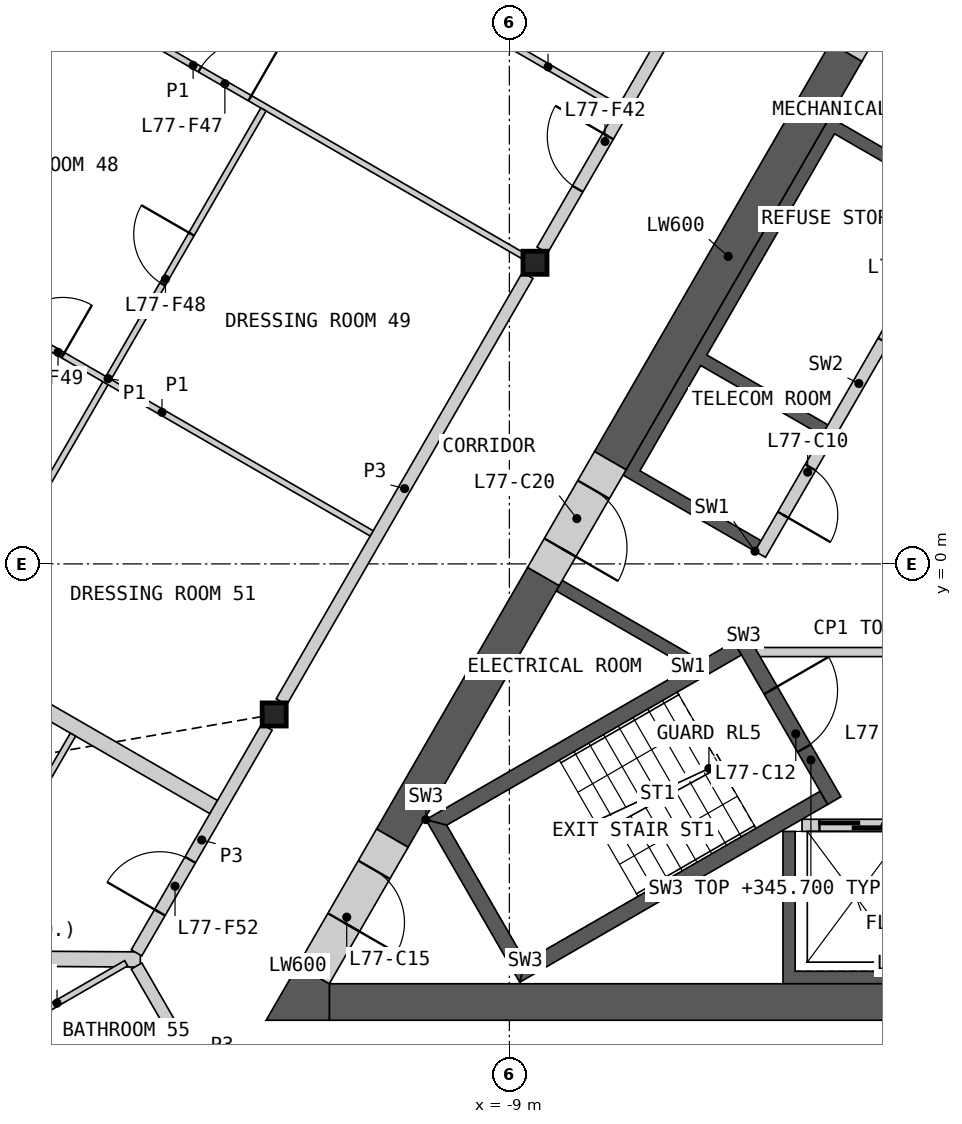
"""IFC4 building model, lengths in metres.
Left out: names, types, materials, properties, quantities, classifications, styles, units other than length and angle.
Written with IfcOpenShell. Run it as: python <this file> out.ifc"""

import sys

from ifc_helpers import new_model, si_unit, direction, frame, frame_2d, origin, origin_2d, place, context, subcontext, project, spatial, polyline, rectangle, i_section, outline, extrude, element, fill, save


model = new_model("IFC4")
c1 = context("Model", 3, precision=1e-05, world=origin(), true_north=direction((0.0, 1.0)))
c2 = subcontext(c1, "Body", "Model", "MODEL_VIEW")
j1 = project(units=[si_unit("LENGTHUNIT", "METRE"), si_unit("PLANEANGLEUNIT", "RADIAN")], contexts=[c1])
p1 = place(None, origin())
s1 = spatial("IfcSite", under=j1, at=p1, CompositionType="ELEMENT")
p2 = place(p1, origin())
s2 = spatial("IfcBuilding", under=s1, at=p2, CompositionType="ELEMENT")
p3 = place(p2, frame((0.0, 0.0, 342.6)))
s3 = spatial("IfcBuildingStorey", under=s2, at=p3, CompositionType="ELEMENT", Elevation=342.6)
for number, where, z_axis, x_axis in (
    (1, (-8.578, 4.953, 0.0), (0.0, 0.0, 1.0), (1.0, 0.0, 0.0)),
    (2, (-12.868, -2.476, 0.0), (0.0, 0.0, 1.0), (1.0, 0.0, 0.0)),
):
    element("IfcColumn", number, at=place(p3, frame(where, z_axis=z_axis, x_axis=x_axis)), inside=s3, PredefinedType="COLUMN", context=c2, shape_type="SweptSolid", body=[
        extrude(i_section(OverallWidth=0.396, OverallDepth=0.381, WebThickness=0.019, FlangeThickness=0.03, at=origin_2d()), origin(), (0.0, 0.0, 1.0), 3.4),
    ])
p4 = place(p3, origin())
e3 = element("IfcWall", 3, at=p4, inside=s3, PredefinedType="SHEAR", context=c2, shape_type="SweptSolid", body=[
    extrude(outline(polyline([(4.5, -4.4), (4.5, -6.906), (-4.5, -6.906), (-4.5, -4.4), (-4.3, -4.4), (-4.3, -6.7), (-2.3, -6.7), (-2.3, -4.4), (-2.1, -4.4), (-2.1, -6.7), (-0.1, -6.7), (-0.1, -4.4), (0.1, -4.4), (0.1, -6.7), (2.1, -6.7), (2.1, -4.4), (2.3, -4.4), (2.3, -6.7), (4.3, -6.7), (4.3, -4.4), (4.5, -4.4)])), origin(), (0.0, 0.0, 1.0), 3.1),
])
p5 = place(p3, frame((-4.187, -4.3, 0.0), z_axis=(0.0, 0.0, 1.0), x_axis=(1.0, 0.0, 0.0)))
e4 = element("IfcWall", 4, at=p5, inside=s3, PredefinedType="SOLIDWALL", context=c2, shape_type="SweptSolid", body=[
    extrude(rectangle(XDim=8.373, YDim=0.2, at=frame_2d((4.187, 0.0))), origin(), (0.0, 0.0, 1.0), 3.1),
])
p6 = place(p5, frame((0.287, 0.0, 0.0)))
e5 = element("IfcOpeningElement", 5, at=p6, cuts=e4, PredefinedType="OPENING", context=c2, shape_type="SweptSolid", body=[
    extrude(rectangle(XDim=1.2, YDim=2.1, at=frame_2d((0.6, 1.05))), frame((0.0, 0.11, 0.0), z_axis=(0.0, -1.0, 0.0), x_axis=(1.0, 0.0, 0.0)), (0.0, 0.0, 1.0), 0.22),
])
p7 = place(p5, frame((2.387, 0.0, 0.0)))
e6 = element("IfcOpeningElement", 6, at=p7, cuts=e4, PredefinedType="OPENING", context=c2, shape_type="SweptSolid", body=[
    extrude(rectangle(XDim=1.4, YDim=2.1, at=frame_2d((0.7, 1.05))), frame((0.0, 0.11, 0.0), z_axis=(0.0, -1.0, 0.0), x_axis=(1.0, 0.0, 0.0)), (0.0, 0.0, 1.0), 0.22),
])
p8 = place(p5, frame((4.737, 0.0, 0.0)))
e7 = element("IfcOpeningElement", 7, at=p8, cuts=e4, PredefinedType="OPENING", context=c2, shape_type="SweptSolid", body=[
    extrude(rectangle(XDim=1.1, YDim=2.1, at=frame_2d((0.55, 1.05))), frame((0.0, 0.11, 0.0), z_axis=(0.0, -1.0, 0.0), x_axis=(1.0, 0.0, 0.0)), (0.0, 0.0, 1.0), 0.22),
])
p9 = place(p5, frame((6.887, 0.0, 0.0)))
e8 = element("IfcOpeningElement", 8, at=p9, cuts=e4, PredefinedType="OPENING", context=c2, shape_type="SweptSolid", body=[
    extrude(rectangle(XDim=1.2, YDim=2.1, at=frame_2d((0.6, 1.05))), frame((0.0, 0.11, 0.0), z_axis=(0.0, -1.0, 0.0), x_axis=(1.0, 0.0, 0.0)), (0.0, 0.0, 1.0), 0.22),
])
p10 = place(p3, origin())
e9 = element("IfcWall", 9, at=p10, inside=s3, PredefinedType="SHEAR", context=c2, shape_type="SweptSolid", body=[
    extrude(outline(polyline([(-6.061, -1.697), (-8.231, -0.444), (-8.131, -0.271), (-5.96, -1.524), (-6.061, -1.697)])), origin(), (0.0, 0.0, 1.0), 3.1),
])
p11 = place(p3, origin())
e10 = element("IfcWall", 10, at=p11, inside=s3, PredefinedType="SHEAR", context=c2, shape_type="SweptSolid", body=[
    extrude(outline(polyline([(-4.96, 0.208), (-7.131, 1.461), (-3.731, 7.35), (-1.561, 6.097), (-1.66, 5.924), (-3.652, 7.074), (-5.752, 3.437), (-3.76, 2.287), (-3.861, 2.113), (-5.852, 3.263), (-6.852, 1.531), (-4.861, 0.381), (-4.96, 0.208)])), origin(), (0.0, 0.0, 1.0), 3.1),
])
p12 = place(p3, frame((-1.631, 5.776, 0.0), z_axis=(0.0, 0.0, 1.0), x_axis=(-0.499992876559, -0.866029516466, 0.0)))
e11 = element("IfcWall", 11, at=p12, inside=s3, PredefinedType="SOLIDWALL", context=c2, shape_type="SweptSolid", body=[
    extrude(rectangle(XDim=6.486, YDim=0.2, at=frame_2d((3.243, 0.0))), origin(), (0.0, 0.0, 1.0), 3.1),
])
p13 = place(p12, frame((1.537, 0.0, 0.0)))
e12 = element("IfcOpeningElement", 12, at=p13, cuts=e11, PredefinedType="OPENING", context=c2, shape_type="SweptSolid", body=[
    extrude(rectangle(XDim=0.9, YDim=2.1, at=frame_2d((0.45, 1.05))), frame((0.0, 0.11, 0.0), z_axis=(0.0, -1.0, 0.0), x_axis=(1.0, 0.0, 0.0)), (0.0, 0.0, 1.0), 0.22),
])
p14 = place(p12, frame((4.837, 0.0, 0.0)))
e13 = element("IfcOpeningElement", 13, at=p14, cuts=e11, PredefinedType="OPENING", context=c2, shape_type="SweptSolid", body=[
    extrude(rectangle(XDim=0.9, YDim=2.1, at=frame_2d((0.45, 1.05))), frame((0.0, 0.11, 0.0), z_axis=(0.0, -1.0, 0.0), x_axis=(1.0, 0.0, 0.0)), (0.0, 0.0, 1.0), 0.22),
])
p15 = place(p3, frame((-4.941, -1.45, 0.0), z_axis=(0.0, 0.0, 1.0), x_axis=(1.0, 0.0, 0.0)))
e14 = element("IfcWall", 14, at=p15, inside=s3, PredefinedType="PARTITIONING", context=c2, shape_type="SweptSolid", body=[
    extrude(rectangle(XDim=9.882, YDim=0.15, at=frame_2d((4.941, 0.0))), origin(), (0.0, 0.0, 1.0), 3.1),
])
p16 = place(p15, frame((4.391, 0.0, 0.0)))
e15 = element("IfcOpeningElement", 15, at=p16, cuts=e14, PredefinedType="OPENING", context=c2, shape_type="SweptSolid", body=[
    extrude(rectangle(XDim=1.1, YDim=2.1, at=frame_2d((0.55, 1.05))), frame((0.0, 0.085, 0.0), z_axis=(0.0, -1.0, 0.0), x_axis=(1.0, 0.0, 0.0)), (0.0, 0.0, 1.0), 0.17),
])
p17 = place(p3, origin())
e16 = element("IfcWall", 16, at=p17, inside=s3, PredefinedType="SHEAR", context=c2, shape_type="SweptSolid", body=[
    extrude(outline(polyline([(-5.307, -1.281), (-10.374, -4.206), (-10.032, -4.298), (-5.182, -1.498), (-5.307, -1.281)])), origin(), (0.0, 0.0, 1.0), 3.1),
])
p18 = place(p3, origin())
e17 = element("IfcWall", 17, at=p18, inside=s3, PredefinedType="SHEAR", context=c2, shape_type="SweptSolid", body=[
    extrude(outline(polyline([(-10.374, -4.206), (-8.83, -6.881), (-8.738, -6.539), (-10.032, -4.298), (-10.374, -4.206)])), origin(), (0.0, 0.0, 1.0), 3.1),
])
p19 = place(p3, origin())
e18 = element("IfcWall", 18, at=p19, inside=s3, PredefinedType="SHEAR", context=c2, shape_type="SweptSolid", body=[
    extrude(outline(polyline([(-8.738, -6.539), (-8.83, -6.881), (-3.763, -3.956), (-3.888, -3.739), (-8.738, -6.539)])), origin(), (0.0, 0.0, 1.0), 3.1),
])
p20 = place(p3, frame((-5.199, -1.219, 0.0), z_axis=(0.0, 0.0, 1.0), x_axis=(0.499982516597, -0.866035497597, 0.0)))
e19 = element("IfcWall", 19, at=p20, inside=s3, PredefinedType="SHEAR", context=c2, shape_type="SweptSolid", body=[
    extrude(rectangle(XDim=3.088, YDim=0.25, at=frame_2d((1.544, 0.0))), origin(), (0.0, 0.0, 1.0), 3.1),
])
p21 = place(p20, frame((0.994, 0.0, 0.0)))
e20 = element("IfcOpeningElement", 20, at=p21, cuts=e19, PredefinedType="OPENING", context=c2, shape_type="SweptSolid", body=[
    extrude(rectangle(XDim=1.1, YDim=2.1, at=frame_2d((0.55, 1.05))), frame((0.0, 0.135, 0.0), z_axis=(0.0, -1.0, 0.0), x_axis=(1.0, 0.0, 0.0)), (0.0, 0.0, 1.0), 0.27),
])
p22 = place(p3, frame((-11.961, -7.206, 0.0), z_axis=(0.0, 0.0, 1.0), x_axis=(1.0, 0.0, 0.0)))
e21 = element("IfcWall", 21, at=p22, inside=s3, PredefinedType="SHEAR", context=c2, shape_type="SweptSolid", body=[
    extrude(rectangle(XDim=23.921, YDim=0.6, at=frame_2d((11.961, 0.0))), origin(), (0.0, 0.0, 1.0), 3.1),
])
p23 = place(p3, frame((-3.461, 8.417, 0.0), z_axis=(0.0, 0.0, 1.0), x_axis=(-0.50000391502, -0.866023143435, 0.0)))
e22 = element("IfcWall", 22, at=p23, inside=s3, PredefinedType="SHEAR", context=c2, shape_type="SweptSolid", body=[
    extrude(rectangle(XDim=7.759, YDim=0.6, at=frame_2d((3.879, 0.0))), origin(), (0.0, 0.0, 1.0), 3.1),
])
p24 = place(p3, frame((-8.44, -0.208, 0.0), z_axis=(0.0, 0.0, 1.0), x_axis=(-0.500007425856, -0.866021116422, 0.0)))
e23 = element("IfcWall", 23, at=p24, inside=s3, PredefinedType="SHEAR", context=c2, shape_type="SweptSolid", body=[
    extrude(rectangle(XDim=4.969, YDim=0.6, at=frame_2d((2.484, 0.0))), origin(), (0.0, 0.0, 1.0), 3.1),
])
p25 = place(p3, origin())
e24 = element("IfcWall", 24, at=p25, inside=s3, PredefinedType="SHEAR", context=c2, shape_type="SweptSolid", body=[
    extrude(outline(polyline([(-12.48, -6.606), (-11.961, -6.906), (-11.961, -7.506), (-13.0, -7.506), (-12.48, -6.606)])), origin(), (0.0, 0.0, 1.0), 3.1),
])
p26 = place(p3, frame((-10.925, -4.511, 0.0), z_axis=(0.0, 0.0, 1.0), x_axis=(-0.500018667571, -0.866014625789, 0.0)))
e25 = element("IfcWall", 25, at=p26, inside=s3, PredefinedType="SHEAR", context=c2, shape_type="SweptSolid", body=[
    extrude(rectangle(XDim=2.592, YDim=0.6, at=frame_2d((1.296, 0.0))), origin(), (0.0, 0.0, 1.0), 3.1),
])
p27 = place(p26, frame((0.6, 0.0, 0.0)))
e26 = element("IfcOpeningElement", 26, at=p27, cuts=e25, PredefinedType="OPENING", context=c2, shape_type="SweptSolid", body=[
    extrude(rectangle(XDim=1.0, YDim=2.1, at=frame_2d((0.5, 1.05))), frame((0.0, 0.31, 0.0), z_axis=(0.0, -1.0, 0.0), x_axis=(1.0, 0.0, 0.0)), (0.0, 0.0, 1.0), 0.62),
])
p28 = place(p3, frame((-2.361, 10.322, 0.0), z_axis=(0.0, 0.0, 1.0), x_axis=(-0.499946605688, -0.86605622881, 0.0)))
e27 = element("IfcWall", 27, at=p28, inside=s3, PredefinedType="SHEAR", context=c2, shape_type="SweptSolid", body=[
    extrude(rectangle(XDim=2.2, YDim=0.6, at=frame_2d((1.1, 0.0))), origin(), (0.0, 0.0, 1.0), 3.1),
])
p29 = place(p28, frame((0.75, 0.0, 0.0)))
e28 = element("IfcOpeningElement", 28, at=p29, cuts=e27, PredefinedType="OPENING", context=c2, shape_type="SweptSolid", body=[
    extrude(rectangle(XDim=1.0, YDim=2.1, at=frame_2d((0.5, 1.05))), frame((0.0, 0.31, 0.0), z_axis=(0.0, -1.0, 0.0), x_axis=(1.0, 0.0, 0.0)), (0.0, 0.0, 1.0), 0.62),
])
p30 = place(p3, frame((-7.34, 1.698, 0.0), z_axis=(0.0, 0.0, 1.0), x_axis=(-0.50002983664, -0.866008176907, 0.0)))
e29 = element("IfcWall", 29, at=p30, inside=s3, PredefinedType="SHEAR", context=c2, shape_type="SweptSolid", body=[
    extrude(rectangle(XDim=2.2, YDim=0.6, at=frame_2d((1.1, 0.0))), origin(), (0.0, 0.0, 1.0), 3.1),
])
p31 = place(p30, frame((0.55, 0.0, 0.0)))
e30 = element("IfcOpeningElement", 30, at=p31, cuts=e29, PredefinedType="OPENING", context=c2, shape_type="SweptSolid", body=[
    extrude(rectangle(XDim=1.1, YDim=2.1, at=frame_2d((0.55, 1.05))), frame((0.0, 0.31, 0.0), z_axis=(0.0, -1.0, 0.0), x_axis=(1.0, 0.0, 0.0)), (0.0, 0.0, 1.0), 0.62),
])
p32 = place(p3, frame((-30.014, -6.41, 0.0), z_axis=(0.0, 0.0, 1.0), x_axis=(0.999979286789, -0.00643630279, 0.0)))
e31 = element("IfcWall", 31, at=p32, inside=s3, PredefinedType="PARTITIONING", context=c2, shape_type="SweptSolid", body=[
    extrude(rectangle(XDim=14.945, YDim=0.25, at=frame_2d((7.473, 0.0))), origin(), (0.0, 0.0, 1.0), 2.33),
])
p33 = place(p3, frame((-24.815, 2.323, 0.0), z_axis=(0.0, 0.0, 1.0), x_axis=(0.866033203648, -0.499986489997, 0.0)))
e32 = element("IfcWall", 32, at=p33, inside=s3, PredefinedType="PARTITIONING", context=c2, shape_type="SweptSolid", body=[
    extrude(rectangle(XDim=12.646, YDim=0.25, at=frame_2d((6.323, 0.0))), origin(), (0.0, 0.0, 1.0), 2.33),
])
p34 = place(p3, frame((-8.458, 5.16, 0.0), z_axis=(0.0, 0.0, 1.0), x_axis=(0.499984266882, 0.866034487114, 0.0)))
e33 = element("IfcWall", 33, at=p34, inside=s3, PredefinedType="PARTITIONING", context=c2, shape_type="SweptSolid", body=[
    extrude(rectangle(XDim=8.099, YDim=0.2, at=frame_2d((4.049, 0.0))), origin(), (0.0, 0.0, 1.0), 3.1),
])
p35 = place(p34, frame((1.164, 0.0, 0.0)))
e34 = element("IfcOpeningElement", 34, at=p35, cuts=e33, PredefinedType="OPENING", context=c2, shape_type="SweptSolid", body=[
    extrude(rectangle(XDim=1.0, YDim=2.1, at=frame_2d((0.5, 1.05))), frame((0.0, 0.11, 0.0), z_axis=(0.0, -1.0, 0.0), x_axis=(1.0, 0.0, 0.0)), (0.0, 0.0, 1.0), 0.22),
])
p36 = place(p3, frame((-12.748, -2.269, 0.0), z_axis=(0.0, 0.0, 1.0), x_axis=(0.499984266882, 0.866034487114, 0.0)))
e35 = element("IfcWall", 35, at=p36, inside=s3, PredefinedType="PARTITIONING", context=c2, shape_type="SweptSolid", body=[
    extrude(rectangle(XDim=8.099, YDim=0.2, at=frame_2d((4.049, 0.0))), origin(), (0.0, 0.0, 1.0), 3.1),
])
p37 = place(p3, frame((-15.131, -6.397, 0.0), z_axis=(0.0, 0.0, 1.0), x_axis=(0.500003406062, 0.866023437285, 0.0)))
e36 = element("IfcWall", 36, at=p37, inside=s3, PredefinedType="PARTITIONING", context=c2, shape_type="SweptSolid", body=[
    extrude(rectangle(XDim=4.288, YDim=0.2, at=frame_2d((2.144, 0.0))), origin(), (0.0, 0.0, 1.0), 3.1),
])
p38 = place(p37, frame((0.766, 0.0, 0.0)))
e37 = element("IfcOpeningElement", 37, at=p38, cuts=e36, PredefinedType="OPENING", context=c2, shape_type="SweptSolid", body=[
    extrude(rectangle(XDim=1.0, YDim=2.1, at=frame_2d((0.5, 1.05))), frame((0.0, 0.11, 0.0), z_axis=(0.0, -1.0, 0.0), x_axis=(1.0, 0.0, 0.0)), (0.0, 0.0, 1.0), 0.22),
])
p39 = place(p3, frame((-15.131, -6.614, 0.0), z_axis=(0.0, 0.0, 1.0), x_axis=(0.499967746641, -0.866044024469, 0.0)))
e38 = element("IfcWall", 38, at=p39, inside=s3, PredefinedType="PARTITIONING", context=c2, shape_type="SweptSolid", body=[
    extrude(rectangle(XDim=3.676, YDim=0.2, at=frame_2d((1.838, 0.0))), origin(), (0.0, 0.0, 1.0), 3.1),
])
p40 = place(p39, frame((2.426, 0.0, 0.0)))
e39 = element("IfcOpeningElement", 39, at=p40, cuts=e38, PredefinedType="OPENING", context=c2, shape_type="SweptSolid", body=[
    extrude(rectangle(XDim=1.0, YDim=2.1, at=frame_2d((0.5, 1.05))), frame((0.0, 0.11, 0.0), z_axis=(0.0, -1.0, 0.0), x_axis=(1.0, 0.0, 0.0)), (0.0, 0.0, 1.0), 0.22),
])
p41 = place(p3, frame((-19.615, 11.325, 0.0), z_axis=(0.0, 0.0, 1.0), x_axis=(0.86602139559, -0.500006942333, 0.0)))
e40 = element("IfcWall", 40, at=p41, inside=s3, PredefinedType="PARTITIONING", context=c2, shape_type="SweptSolid", body=[
    extrude(rectangle(XDim=12.505, YDim=0.1, at=frame_2d((6.252, 0.0))), origin(), (0.0, 0.0, 1.0), 2.33),
])
p42 = place(p41, frame((6.38, 0.0, 0.0)))
e41 = element("IfcOpeningElement", 41, at=p42, cuts=e40, PredefinedType="OPENING", context=c2, shape_type="SweptSolid", body=[
    extrude(rectangle(XDim=0.95, YDim=2.1, at=frame_2d((0.475, 1.05))), frame((0.0, 0.06, 0.0), z_axis=(0.0, -1.0, 0.0), x_axis=(1.0, 0.0, 0.0)), (0.0, 0.0, 1.0), 0.12),
])
p43 = place(p3, frame((-18.154, -1.377, 0.0), z_axis=(0.0, 0.0, 1.0), x_axis=(0.49998782916, 0.866032430508, 0.0)))
e42 = element("IfcWall", 42, at=p43, inside=s3, PredefinedType="PARTITIONING", context=c2, shape_type="SweptSolid", body=[
    extrude(rectangle(XDim=10.22, YDim=0.1, at=frame_2d((5.11, 0.0))), origin(), (0.0, 0.0, 1.0), 2.33),
])
p44 = place(p43, frame((6.903, 0.0, 0.0)))
e43 = element("IfcOpeningElement", 43, at=p44, cuts=e42, PredefinedType="OPENING", context=c2, shape_type="SweptSolid", body=[
    extrude(rectangle(XDim=0.95, YDim=2.1, at=frame_2d((0.475, 1.05))), frame((0.0, 0.06, 0.0), z_axis=(0.0, -1.0, 0.0), x_axis=(1.0, 0.0, 0.0)), (0.0, 0.0, 1.0), 0.12),
])
p45 = place(p43, frame((0.552, 0.0, 0.0)))
e44 = element("IfcOpeningElement", 44, at=p45, cuts=e42, PredefinedType="OPENING", context=c2, shape_type="SweptSolid", body=[
    extrude(rectangle(XDim=0.95, YDim=2.1, at=frame_2d((0.475, 1.05))), frame((0.0, 0.06, 0.0), z_axis=(0.0, -1.0, 0.0), x_axis=(1.0, 0.0, 0.0)), (0.0, 0.0, 1.0), 0.12),
])
p46 = place(p3, frame((-18.161, 4.484, 0.0), z_axis=(0.0, 0.0, 1.0), x_axis=(0.86602732995, -0.499996663769, 0.0)))
e45 = element("IfcWall", 45, at=p46, inside=s3, PredefinedType="PARTITIONING", context=c2, shape_type="SweptSolid", body=[
    extrude(rectangle(XDim=7.964, YDim=0.1, at=frame_2d((3.982, 0.0))), origin(), (0.0, 0.0, 1.0), 2.33),
])
p47 = place(p46, frame((1.152, 0.0, 0.0)))
e46 = element("IfcOpeningElement", 46, at=p47, cuts=e45, PredefinedType="OPENING", context=c2, shape_type="SweptSolid", body=[
    extrude(rectangle(XDim=0.95, YDim=2.1, at=frame_2d((0.475, 1.05))), frame((0.0, 0.06, 0.0), z_axis=(0.0, -1.0, 0.0), x_axis=(1.0, 0.0, 0.0)), (0.0, 0.0, 1.0), 0.12),
])
p48 = place(p3, frame((-17.439, -4.995, 0.0), z_axis=(0.0, 0.0, 1.0), x_axis=(0.499976333282, 0.866039067339, 0.0)))
e47 = element("IfcWall", 47, at=p48, inside=s3, PredefinedType="PARTITIONING", context=c2, shape_type="SweptSolid", body=[
    extrude(rectangle(XDim=2.525, YDim=0.1, at=frame_2d((1.262, 0.0))), origin(), (0.0, 0.0, 1.0), 2.33),
])
p49 = place(p3, frame((-17.575, -7.881, 0.0), z_axis=(0.0, 0.0, 1.0), x_axis=(0.866013657776, 0.500020344131, 0.0)))
e48 = element("IfcWall", 48, at=p49, inside=s3, PredefinedType="PARTITIONING", context=c2, shape_type="SweptSolid", body=[
    extrude(rectangle(XDim=2.625, YDim=0.1, at=frame_2d((1.312, 0.0))), origin(), (0.0, 0.0, 1.0), 2.33),
])
p50 = place(p3, frame((-9.511, 8.837, 0.0), z_axis=(0.0, 0.0, 1.0), x_axis=(0.866029095148, -0.499993606316, 0.0)))
e49 = element("IfcWall", 49, at=p50, inside=s3, PredefinedType="PARTITIONING", context=c2, shape_type="SweptSolid", body=[
    extrude(rectangle(XDim=2.65, YDim=0.1, at=frame_2d((1.325, 0.0))), origin(), (0.0, 0.0, 1.0), 2.33),
])
p51 = place(p3, frame((-17.507, -7.899, 0.0), z_axis=(0.0, 0.0, 1.0), x_axis=(0.499946605688, -0.86605622881, 0.0)))
e50 = element("IfcWall", 50, at=p51, inside=s3, PredefinedType="PARTITIONING", context=c2, shape_type="SweptSolid", body=[
    extrude(rectangle(XDim=2.2, YDim=0.1, at=frame_2d((1.1, 0.0))), origin(), (0.0, 0.0, 1.0), 2.33),
])
p52 = place(p6, origin())
e51 = element("IfcDoor", 51, at=p52, inside=s3, OperationType="SLIDING_TO_LEFT", PredefinedType="DOOR", context=c2, shape_type="SweptSolid", body=[
    extrude(rectangle(XDim=1.2, YDim=2.1, at=frame_2d((0.6, 1.05))), frame((0.0, 0.025, 0.0), z_axis=(0.0, -1.0, 0.0), x_axis=(1.0, 0.0, 0.0)), (0.0, 0.0, 1.0), 0.05),
])
fill(e5, e51)
p53 = place(p13, origin())
e52 = element("IfcDoor", 52, at=p53, inside=s3, OperationType="SINGLE_SWING_LEFT", PredefinedType="DOOR", context=c2, shape_type="SweptSolid", body=[
    extrude(rectangle(XDim=0.9, YDim=2.1, at=frame_2d((0.45, 1.05))), frame((0.0, 0.025, 0.0), z_axis=(0.0, -1.0, 0.0), x_axis=(1.0, 0.0, 0.0)), (0.0, 0.0, 1.0), 0.05),
])
fill(e12, e52)
p54 = place(p14, origin())
e53 = element("IfcDoor", 53, at=p54, inside=s3, OperationType="SINGLE_SWING_RIGHT", PredefinedType="DOOR", context=c2, shape_type="SweptSolid", body=[
    extrude(rectangle(XDim=0.9, YDim=2.1, at=frame_2d((0.45, 1.05))), frame((0.0, 0.025, 0.0), z_axis=(0.0, -1.0, 0.0), x_axis=(1.0, 0.0, 0.0)), (0.0, 0.0, 1.0), 0.05),
])
fill(e13, e53)
p55 = place(p21, origin())
e54 = element("IfcDoor", 54, at=p55, inside=s3, OperationType="SINGLE_SWING_LEFT", PredefinedType="DOOR", context=c2, shape_type="SweptSolid", body=[
    extrude(rectangle(XDim=1.1, YDim=2.1, at=frame_2d((0.55, 1.05))), frame((0.0, 0.025, 0.0), z_axis=(0.0, -1.0, 0.0), x_axis=(1.0, 0.0, 0.0)), (0.0, 0.0, 1.0), 0.05),
])
fill(e20, e54)
p56 = place(p27, origin())
e55 = element("IfcDoor", 55, at=p56, inside=s3, OperationType="SINGLE_SWING_RIGHT", PredefinedType="DOOR", context=c2, shape_type="SweptSolid", body=[
    extrude(rectangle(XDim=1.0, YDim=2.1, at=frame_2d((0.5, 1.05))), frame((0.0, 0.055, 0.0), z_axis=(0.0, -1.0, 0.0), x_axis=(1.0, 0.0, 0.0)), (0.0, 0.0, 1.0), 0.05),
])
fill(e26, e55)
p57 = place(p31, origin())
e56 = element("IfcDoor", 56, at=p57, inside=s3, OperationType="SINGLE_SWING_RIGHT", PredefinedType="DOOR", context=c2, shape_type="SweptSolid", body=[
    extrude(rectangle(XDim=1.1, YDim=2.1, at=frame_2d((0.55, 1.05))), frame((0.0, 0.055, 0.0), z_axis=(0.0, -1.0, 0.0), x_axis=(1.0, 0.0, 0.0)), (0.0, 0.0, 1.0), 0.05),
])
fill(e30, e56)
p58 = place(p35, origin())
e57 = element("IfcDoor", 57, at=p58, inside=s3, OperationType="SINGLE_SWING_RIGHT", PredefinedType="DOOR", context=c2, shape_type="SweptSolid", body=[
    extrude(rectangle(XDim=1.0, YDim=2.1, at=frame_2d((0.5, 1.05))), frame((0.0, 0.025, 0.0), z_axis=(0.0, -1.0, 0.0), x_axis=(1.0, 0.0, 0.0)), (0.0, 0.0, 1.0), 0.05),
])
fill(e34, e57)
p59 = place(p42, origin())
e58 = element("IfcDoor", 58, at=p59, inside=s3, OperationType="SINGLE_SWING_RIGHT", PredefinedType="DOOR", context=c2, shape_type="SweptSolid", body=[
    extrude(rectangle(XDim=0.95, YDim=2.1, at=frame_2d((0.475, 1.05))), frame((0.0, 0.025, 0.0), z_axis=(0.0, -1.0, 0.0), x_axis=(1.0, 0.0, 0.0)), (0.0, 0.0, 1.0), 0.05),
])
fill(e41, e58)
p60 = place(p44, origin())
e59 = element("IfcDoor", 59, at=p60, inside=s3, OperationType="SINGLE_SWING_RIGHT", PredefinedType="DOOR", context=c2, shape_type="SweptSolid", body=[
    extrude(rectangle(XDim=0.95, YDim=2.1, at=frame_2d((0.475, 1.05))), frame((0.0, 0.025, 0.0), z_axis=(0.0, -1.0, 0.0), x_axis=(1.0, 0.0, 0.0)), (0.0, 0.0, 1.0), 0.05),
])
fill(e43, e59)
p61 = place(p47, origin())
e60 = element("IfcDoor", 60, at=p61, inside=s3, OperationType="SINGLE_SWING_RIGHT", PredefinedType="DOOR", context=c2, shape_type="SweptSolid", body=[
    extrude(rectangle(XDim=0.95, YDim=2.1, at=frame_2d((0.475, 1.05))), frame((0.0, 0.025, 0.0), z_axis=(0.0, -1.0, 0.0), x_axis=(1.0, 0.0, 0.0)), (0.0, 0.0, 1.0), 0.05),
])
fill(e46, e60)
p62 = place(p38, origin())
e61 = element("IfcDoor", 61, at=p62, inside=s3, OperationType="SINGLE_SWING_LEFT", PredefinedType="DOOR", context=c2, shape_type="SweptSolid", body=[
    extrude(rectangle(XDim=1.0, YDim=2.1, at=frame_2d((0.5, 1.05))), frame((0.0, 0.025, 0.0), z_axis=(0.0, -1.0, 0.0), x_axis=(1.0, 0.0, 0.0)), (0.0, 0.0, 1.0), 0.05),
])
fill(e37, e61)
save(model, sys.argv[1])
